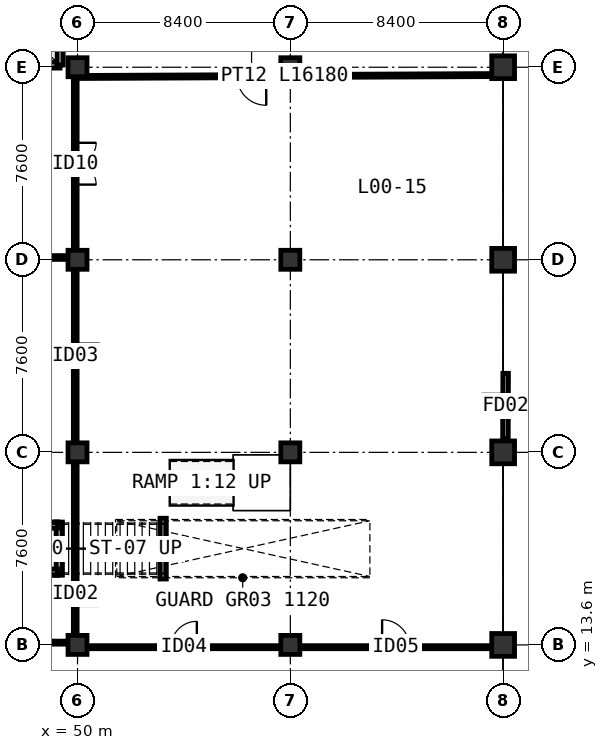
"""IFC4 building model, lengths in metres.
Left out: names, types, materials, properties, quantities, classifications, styles, units other than length and angle.
Written with IfcOpenShell. Run it as: python <this file> out.ifc"""

import sys

from ifc_helpers import new_model, si_unit, direction, frame, frame_2d, origin, origin_2d, place, context, subcontext, project, spatial, rectangle, extrude, element, fill, save


model = new_model("IFC4")
c1 = context("Model", 3, precision=1e-05, world=origin(), true_north=direction((0.0, 1.0)))
c2 = subcontext(c1, "Body", "Model", "MODEL_VIEW")
j1 = project(units=[si_unit("LENGTHUNIT", "METRE"), si_unit("PLANEANGLEUNIT", "RADIAN")], contexts=[c1])
p1 = place(None, origin())
s1 = spatial("IfcSite", under=j1, at=p1, CompositionType="ELEMENT")
p2 = place(p1, origin())
s2 = spatial("IfcBuilding", under=s1, at=p2, CompositionType="ELEMENT")
p3 = place(p2, origin())
s3 = spatial("IfcBuildingStorey", under=s2, at=p3, CompositionType="ELEMENT", Elevation=0.0)
for number, where, z_axis, x_axis in (
    (1, (50.0, 13.6, 0.0), (0.0, 0.0, 1.0), (1.0, 0.0, 0.0)),
    (2, (58.4, 13.6, 0.0), (0.0, 0.0, 1.0), (1.0, 0.0, 0.0)),
):
    element("IfcColumn", number, at=place(p3, frame(where, z_axis=z_axis, x_axis=x_axis)), inside=s3, PredefinedType="COLUMN", context=c2, shape_type="SweptSolid", body=[
        extrude(rectangle(XDim=0.75, YDim=0.75, at=origin_2d()), origin(), (0.0, 0.0, 1.0), 4.8),
    ])
p4 = place(p3, frame((66.8, 13.6, 0.0), z_axis=(0.0, 0.0, 1.0), x_axis=(1.0, 0.0, 0.0)))
e3 = element("IfcColumn", 3, at=p4, inside=s3, PredefinedType="COLUMN", context=c2, shape_type="SweptSolid", body=[
    extrude(rectangle(XDim=0.9, YDim=0.9, at=origin_2d()), origin(), (0.0, 0.0, 1.0), 4.8),
])
for number, where, z_axis, x_axis in (
    (4, (50.0, 21.2, 0.0), (0.0, 0.0, 1.0), (1.0, 0.0, 0.0)),
    (5, (58.4, 21.2, 0.0), (0.0, 0.0, 1.0), (1.0, 0.0, 0.0)),
):
    element("IfcColumn", number, at=place(p3, frame(where, z_axis=z_axis, x_axis=x_axis)), inside=s3, PredefinedType="COLUMN", context=c2, shape_type="SweptSolid", body=[
        extrude(rectangle(XDim=0.75, YDim=0.75, at=origin_2d()), origin(), (0.0, 0.0, 1.0), 4.8),
    ])
p5 = place(p3, frame((66.8, 21.2, 0.0), z_axis=(0.0, 0.0, 1.0), x_axis=(1.0, 0.0, 0.0)))
e6 = element("IfcColumn", 6, at=p5, inside=s3, PredefinedType="COLUMN", context=c2, shape_type="SweptSolid", body=[
    extrude(rectangle(XDim=0.9, YDim=0.9, at=origin_2d()), origin(), (0.0, 0.0, 1.0), 4.8),
])
for number, where, z_axis, x_axis in (
    (7, (50.0, 28.8, 0.0), (0.0, 0.0, 1.0), (1.0, 0.0, 0.0)),
    (8, (58.4, 28.8, 0.0), (0.0, 0.0, 1.0), (1.0, 0.0, 0.0)),
):
    element("IfcColumn", number, at=place(p3, frame(where, z_axis=z_axis, x_axis=x_axis)), inside=s3, PredefinedType="COLUMN", context=c2, shape_type="SweptSolid", body=[
        extrude(rectangle(XDim=0.75, YDim=0.75, at=origin_2d()), origin(), (0.0, 0.0, 1.0), 4.8),
    ])
p6 = place(p3, frame((66.8, 28.8, 0.0), z_axis=(0.0, 0.0, 1.0), x_axis=(1.0, 0.0, 0.0)))
e9 = element("IfcColumn", 9, at=p6, inside=s3, PredefinedType="COLUMN", context=c2, shape_type="SweptSolid", body=[
    extrude(rectangle(XDim=0.9, YDim=0.9, at=origin_2d()), origin(), (0.0, 0.0, 1.0), 4.8),
])
for number, where, z_axis, x_axis in (
    (10, (50.0, 36.4, 0.0), (0.0, 0.0, 1.0), (1.0, 0.0, 0.0)),
    (11, (58.4, 36.4, 0.0), (0.0, 0.0, 1.0), (1.0, 0.0, 0.0)),
):
    element("IfcColumn", number, at=place(p3, frame(where, z_axis=z_axis, x_axis=x_axis)), inside=s3, PredefinedType="COLUMN", context=c2, shape_type="SweptSolid", body=[
        extrude(rectangle(XDim=0.75, YDim=0.75, at=origin_2d()), origin(), (0.0, 0.0, 1.0), 4.8),
    ])
p7 = place(p3, frame((66.8, 36.4, 0.0), z_axis=(0.0, 0.0, 1.0), x_axis=(1.0, 0.0, 0.0)))
e12 = element("IfcColumn", 12, at=p7, inside=s3, PredefinedType="COLUMN", context=c2, shape_type="SweptSolid", body=[
    extrude(rectangle(XDim=0.9, YDim=0.9, at=origin_2d()), origin(), (0.0, 0.0, 1.0), 4.8),
])
p8 = place(p3, frame((47.19, 36.49, 0.0), z_axis=(0.0, 0.0, 1.0), x_axis=(1.0, 0.0, 0.0)))
e13 = element("IfcWall", 13, at=p8, inside=s3, PredefinedType="SHEAR", context=c2, shape_type="SweptSolid", body=[
    extrude(rectangle(XDim=2.12, YDim=0.25, at=frame_2d((1.06, 0.0))), origin(), (0.0, 0.0, 1.0), 4.52),
])
p9 = place(p3, frame((49.31, 36.49, 0.0), z_axis=(0.0, 0.0, 1.0), x_axis=(0.0, 1.0, 0.0)))
e14 = element("IfcWall", 14, at=p9, inside=s3, PredefinedType="SHEAR", context=c2, shape_type="SweptSolid", body=[
    extrude(rectangle(XDim=1.82, YDim=0.25, at=frame_2d((0.91, 0.0))), origin(), (0.0, 0.0, 1.0), 4.52),
])
p10 = place(p3, frame((49.28, 16.35, 0.0), z_axis=(0.0, 0.0, 1.0), x_axis=(0.0, 1.0, 0.0)))
e15 = element("IfcWall", 15, at=p10, inside=s3, PredefinedType="SHEAR", context=c2, shape_type="SweptSolid", body=[
    extrude(rectangle(XDim=2.1, YDim=0.25, at=frame_2d((1.05, 0.0))), origin(), (0.0, 0.0, 1.0), 2.21),
])
for number, where, z_axis, x_axis in (
    (16, (47.21, 16.47, 0.0), (0.0, 0.0, 1.0), (1.0, 0.0, 0.0)),
    (17, (47.21, 18.33, 0.0), (0.0, 0.0, 1.0), (1.0, 0.0, 0.0)),
):
    element("IfcWall", number, at=place(p3, frame(where, z_axis=z_axis, x_axis=x_axis)), inside=s3, PredefinedType="SHEAR", context=c2, shape_type="SweptSolid", body=[
        extrude(rectangle(XDim=2.0, YDim=0.25, at=frame_2d((1.0, 0.0))), origin(), (0.0, 0.0, 1.0), 2.21),
    ])
p11 = place(p3, frame((53.38, 16.2, 0.0), z_axis=(0.0, 0.0, 1.0), x_axis=(0.0, 1.0, 0.0)))
e18 = element("IfcWall", 18, at=p11, inside=s3, PredefinedType="SHEAR", context=c2, shape_type="SweptSolid", body=[
    extrude(rectangle(XDim=2.4, YDim=0.25, at=frame_2d((1.2, 0.0))), origin(), (0.0, 0.0, 1.0), 4.798),
])
p12 = place(p3, frame((66.89, 21.74, 0.0), z_axis=(0.0, 0.0, 1.0), x_axis=(0.003406490455, 0.999994197895, 0.0)))
e19 = element("IfcWall", 19, at=p12, inside=s3, PredefinedType="SOLIDWALL", context=c2, shape_type="SweptSolid", body=[
    extrude(rectangle(XDim=2.58, YDim=0.22, at=frame_2d((1.29, 0.0))), origin(), (0.0, 0.0, 1.0), 3.81),
])
p13 = place(p12, frame((0.815, 0.0, 0.0)))
e20 = element("IfcOpeningElement", 20, at=p13, cuts=e19, PredefinedType="OPENING", context=c2, shape_type="SweptSolid", body=[
    extrude(rectangle(XDim=0.95, YDim=2.1, at=frame_2d((0.475, 1.05))), frame((0.0, 0.12, 0.0), z_axis=(0.0, -1.0, 0.0), x_axis=(1.0, 0.0, 0.0)), (0.0, 0.0, 1.0), 0.24),
])
p14 = place(p3, frame((66.26, 36.09, 0.0), z_axis=(0.0, 0.0, 1.0), x_axis=(-0.999989479484, -0.004587038489, 0.0)))
e21 = element("IfcWall", 21, at=p14, inside=s3, PredefinedType="PARTITIONING", context=c2, shape_type="SweptSolid", body=[
    extrude(rectangle(XDim=16.18, YDim=0.12, at=frame_2d((8.09, 0.0))), origin(), (0.0, 0.0, 1.0), 4.5),
])
p15 = place(p14, frame((8.815, 0.0, 0.0)))
e22 = element("IfcOpeningElement", 22, at=p15, cuts=e21, PredefinedType="OPENING", context=c2, shape_type="SweptSolid", body=[
    extrude(rectangle(XDim=1.15, YDim=2.12, at=frame_2d((0.575, 1.06))), frame((0.0, 0.07, 0.0), z_axis=(0.0, -1.0, 0.0), x_axis=(1.0, 0.0, 0.0)), (0.0, 0.0, 1.0), 0.14),
])
p16 = place(p3, frame((49.91, 35.92, 0.0), z_axis=(0.0, 0.0, 1.0), x_axis=(-7.3370263e-05, -0.999999997308, 0.0)))
e23 = element("IfcWall", 23, at=p16, inside=s3, PredefinedType="PARTITIONING", context=c2, shape_type="SweptSolid", body=[
    extrude(rectangle(XDim=6.655, YDim=0.15, at=frame_2d((3.328, 0.0))), origin(), (0.0, 0.0, 1.0), 3.81),
])
p17 = place(p16, frame((2.502, 0.0, 0.0)))
e24 = element("IfcOpeningElement", 24, at=p17, cuts=e23, PredefinedType="OPENING", context=c2, shape_type="SweptSolid", body=[
    extrude(rectangle(XDim=1.65, YDim=2.18, at=frame_2d((0.825, 1.09))), frame((0.0, 0.085, 0.0), z_axis=(0.0, -1.0, 0.0), x_axis=(1.0, 0.0, 0.0)), (0.0, 0.0, 1.0), 0.17),
])
p18 = place(p3, frame((49.91, 20.735, 0.0), z_axis=(0.0, 0.0, 1.0), x_axis=(0.0, -1.0, 0.0)))
e25 = element("IfcWall", 25, at=p18, inside=s3, PredefinedType="PARTITIONING", context=c2, shape_type="SweptSolid", body=[
    extrude(rectangle(XDim=6.67, YDim=0.15, at=frame_2d((3.335, 0.0))), origin(), (0.0, 0.0, 1.0), 4.5),
])
p19 = place(p18, frame((4.675, 0.0, 0.0)))
e26 = element("IfcOpeningElement", 26, at=p19, cuts=e25, PredefinedType="OPENING", context=c2, shape_type="SweptSolid", body=[
    extrude(rectangle(XDim=0.92, YDim=2.08, at=frame_2d((0.46, 1.04))), frame((0.0, 0.085, 0.0), z_axis=(0.0, -1.0, 0.0), x_axis=(1.0, 0.0, 0.0)), (0.0, 0.0, 1.0), 0.17),
])
p20 = place(p3, frame((49.91, 28.335, 0.0), z_axis=(0.0, 0.0, 1.0), x_axis=(0.0, -1.0, 0.0)))
e27 = element("IfcWall", 27, at=p20, inside=s3, PredefinedType="PARTITIONING", context=c2, shape_type="SweptSolid", body=[
    extrude(rectangle(XDim=6.67, YDim=0.15, at=frame_2d((3.335, 0.0))), origin(), (0.0, 0.0, 1.0), 4.5),
])
p21 = place(p20, frame((2.845, 0.0, 0.0)))
e28 = element("IfcOpeningElement", 28, at=p21, cuts=e27, PredefinedType="OPENING", context=c2, shape_type="SweptSolid", body=[
    extrude(rectangle(XDim=0.98, YDim=2.08, at=frame_2d((0.49, 1.04))), frame((0.0, 0.085, 0.0), z_axis=(0.0, -1.0, 0.0), x_axis=(1.0, 0.0, 0.0)), (0.0, 0.0, 1.0), 0.17),
])
p22 = place(p3, frame((50.465, 13.51, 0.0), z_axis=(0.0, 0.0, 1.0), x_axis=(1.0, 0.0, 0.0)))
e29 = element("IfcWall", 29, at=p22, inside=s3, PredefinedType="PARTITIONING", context=c2, shape_type="SweptSolid", body=[
    extrude(rectangle(XDim=7.47, YDim=0.12, at=frame_2d((3.735, 0.0))), origin(), (0.0, 0.0, 1.0), 3.81),
])
p23 = place(p22, frame((3.225, 0.0, 0.0)))
e30 = element("IfcOpeningElement", 30, at=p23, cuts=e29, PredefinedType="OPENING", context=c2, shape_type="SweptSolid", body=[
    extrude(rectangle(XDim=1.02, YDim=2.12, at=frame_2d((0.51, 1.06))), frame((0.0, 0.07, 0.0), z_axis=(0.0, -1.0, 0.0), x_axis=(1.0, 0.0, 0.0)), (0.0, 0.0, 1.0), 0.14),
])
p24 = place(p3, frame((58.865, 13.51, 0.0), z_axis=(0.0, 0.0, 1.0), x_axis=(1.0, 0.0, 0.0)))
e31 = element("IfcWall", 31, at=p24, inside=s3, PredefinedType="PARTITIONING", context=c2, shape_type="SweptSolid", body=[
    extrude(rectangle(XDim=7.395, YDim=0.12, at=frame_2d((3.698, 0.0))), origin(), (0.0, 0.0, 1.0), 3.81),
])
p25 = place(p24, frame((3.157, 0.0, 0.0)))
e32 = element("IfcOpeningElement", 32, at=p25, cuts=e31, PredefinedType="OPENING", context=c2, shape_type="SweptSolid", body=[
    extrude(rectangle(XDim=1.08, YDim=2.12, at=frame_2d((0.54, 1.06))), frame((0.0, 0.07, 0.0), z_axis=(0.0, -1.0, 0.0), x_axis=(1.0, 0.0, 0.0)), (0.0, 0.0, 1.0), 0.14),
])
p26 = place(p3, frame((49.535, 28.89, 0.0), z_axis=(0.0, 0.0, 1.0), x_axis=(-1.0, 0.0, 0.0)))
e33 = element("IfcWall", 33, at=p26, inside=s3, PredefinedType="PARTITIONING", context=c2, shape_type="SweptSolid", body=[
    extrude(rectangle(XDim=7.47, YDim=0.15, at=frame_2d((3.735, 0.0))), origin(), (0.0, 0.0, 1.0), 3.81),
])
p27 = place(p26, frame((3.11, 0.0, 0.0)))
e34 = element("IfcOpeningElement", 34, at=p27, cuts=e33, PredefinedType="OPENING", context=c2, shape_type="SweptSolid", body=[
    extrude(rectangle(XDim=1.25, YDim=2.12, at=frame_2d((0.625, 1.06))), frame((0.0, 0.085, 0.0), z_axis=(0.0, -1.0, 0.0), x_axis=(1.0, 0.0, 0.0)), (0.0, 0.0, 1.0), 0.17),
])
p28 = place(p3, frame((49.535, 13.69, 0.0), z_axis=(0.0, 0.0, 1.0), x_axis=(-1.0, 0.0, 0.0)))
e35 = element("IfcWall", 35, at=p28, inside=s3, PredefinedType="PARTITIONING", context=c2, shape_type="SweptSolid", body=[
    extrude(rectangle(XDim=7.47, YDim=0.12, at=frame_2d((3.735, 0.0))), origin(), (0.0, 0.0, 1.0), 3.81),
])
p29 = place(p28, frame((3.01, 0.0, 0.0)))
e36 = element("IfcOpeningElement", 36, at=p29, cuts=e35, PredefinedType="OPENING", context=c2, shape_type="SweptSolid", body=[
    extrude(rectangle(XDim=1.45, YDim=2.18, at=frame_2d((0.725, 1.09))), frame((0.0, 0.07, 0.0), z_axis=(0.0, -1.0, 0.0), x_axis=(1.0, 0.0, 0.0)), (0.0, 0.0, 1.0), 0.14),
])
p30 = place(p13, origin())
e37 = element("IfcDoor", 37, at=p30, inside=s3, OperationType="SINGLE_SWING_RIGHT", PredefinedType="DOOR", context=c2, shape_type="SweptSolid", body=[
    extrude(rectangle(XDim=0.95, YDim=2.1, at=frame_2d((0.475, 1.05))), frame((0.0, 0.025, 0.0), z_axis=(0.0, -1.0, 0.0), x_axis=(1.0, 0.0, 0.0)), (0.0, 0.0, 1.0), 0.05),
])
fill(e20, e37)
p31 = place(p15, origin())
e38 = element("IfcDoor", 38, at=p31, inside=s3, OperationType="SINGLE_SWING_LEFT", PredefinedType="DOOR", context=c2, shape_type="SweptSolid", body=[
    extrude(rectangle(XDim=1.15, YDim=2.12, at=frame_2d((0.575, 1.06))), frame((0.0, 0.025, 0.0), z_axis=(0.0, -1.0, 0.0), x_axis=(1.0, 0.0, 0.0)), (0.0, 0.0, 1.0), 0.05),
])
fill(e22, e38)
p32 = place(p17, origin())
e39 = element("IfcDoor", 39, at=p32, inside=s3, OperationType="DOUBLE_DOOR_SINGLE_SWING", PredefinedType="DOOR", context=c2, shape_type="SweptSolid", body=[
    extrude(rectangle(XDim=1.65, YDim=2.18, at=frame_2d((0.825, 1.09))), frame((0.0, 0.025, 0.0), z_axis=(0.0, -1.0, 0.0), x_axis=(1.0, 0.0, 0.0)), (0.0, 0.0, 1.0), 0.05),
])
fill(e24, e39)
p33 = place(p19, origin())
e40 = element("IfcDoor", 40, at=p33, inside=s3, OperationType="SINGLE_SWING_RIGHT", PredefinedType="DOOR", context=c2, shape_type="SweptSolid", body=[
    extrude(rectangle(XDim=0.92, YDim=2.08, at=frame_2d((0.46, 1.04))), frame((0.0, 0.025, 0.0), z_axis=(0.0, -1.0, 0.0), x_axis=(1.0, 0.0, 0.0)), (0.0, 0.0, 1.0), 0.05),
])
fill(e26, e40)
p34 = place(p21, origin())
e41 = element("IfcDoor", 41, at=p34, inside=s3, OperationType="SINGLE_SWING_LEFT", PredefinedType="DOOR", context=c2, shape_type="SweptSolid", body=[
    extrude(rectangle(XDim=0.98, YDim=2.08, at=frame_2d((0.49, 1.04))), frame((0.0, 0.025, 0.0), z_axis=(0.0, -1.0, 0.0), x_axis=(1.0, 0.0, 0.0)), (0.0, 0.0, 1.0), 0.05),
])
fill(e28, e41)
p35 = place(p23, origin())
e42 = element("IfcDoor", 42, at=p35, inside=s3, OperationType="SINGLE_SWING_RIGHT", PredefinedType="DOOR", context=c2, shape_type="SweptSolid", body=[
    extrude(rectangle(XDim=1.02, YDim=2.12, at=frame_2d((0.51, 1.06))), frame((0.0, 0.025, 0.0), z_axis=(0.0, -1.0, 0.0), x_axis=(1.0, 0.0, 0.0)), (0.0, 0.0, 1.0), 0.05),
])
fill(e30, e42)
p36 = place(p25, origin())
e43 = element("IfcDoor", 43, at=p36, inside=s3, OperationType="SINGLE_SWING_LEFT", PredefinedType="DOOR", context=c2, shape_type="SweptSolid", body=[
    extrude(rectangle(XDim=1.08, YDim=2.12, at=frame_2d((0.54, 1.06))), frame((0.0, 0.025, 0.0), z_axis=(0.0, -1.0, 0.0), x_axis=(1.0, 0.0, 0.0)), (0.0, 0.0, 1.0), 0.05),
])
fill(e32, e43)
save(model, sys.argv[1])
